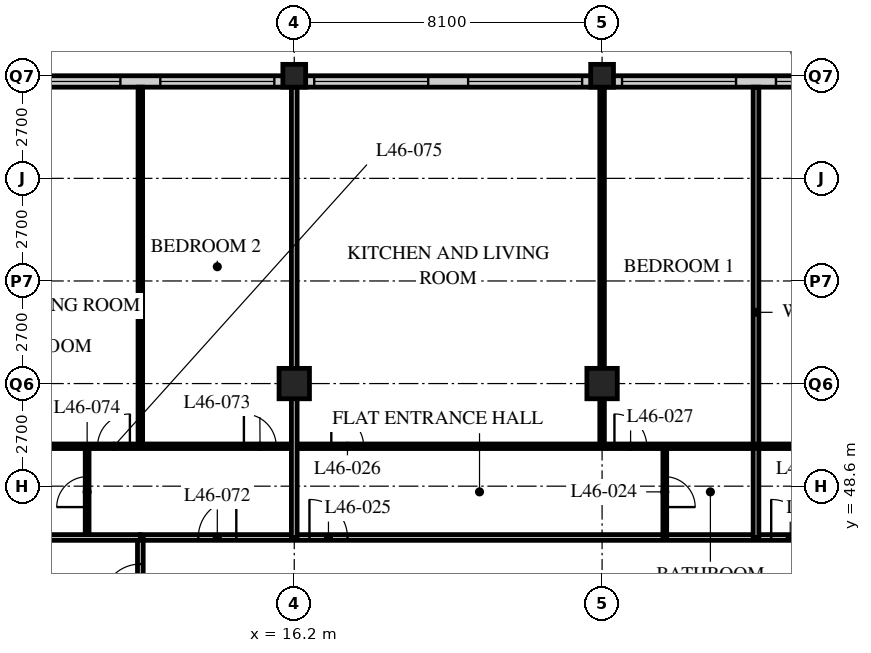
"""IFC4 building model, lengths in metres.
Left out: names, types, materials, properties, quantities, classifications, styles, units other than length and angle.
Written with IfcOpenShell. Run it as: python <this file> out.ifc"""

import sys

from ifc_helpers import new_model, si_unit, direction, frame, frame_2d, origin, origin_2d, place, context, subcontext, project, spatial, rectangle, hollow_rectangle, extrude, element, fill, save


model = new_model("IFC4")
c1 = context("Model", 3, precision=1e-05, world=origin(), true_north=direction((0.0, 1.0)))
c2 = subcontext(c1, "Body", "Model", "MODEL_VIEW")
j1 = project(units=[si_unit("LENGTHUNIT", "METRE"), si_unit("PLANEANGLEUNIT", "RADIAN")], contexts=[c1])
p1 = place(None, origin())
s1 = spatial("IfcSite", under=j1, at=p1, CompositionType="ELEMENT")
p2 = place(p1, origin())
s2 = spatial("IfcBuilding", under=s1, at=p2, CompositionType="ELEMENT")
p3 = place(p2, frame((0.0, 0.0, 181.2)))
s3 = spatial("IfcBuildingStorey", under=s2, at=p3, CompositionType="ELEMENT", Elevation=181.2)
p4 = place(p3, frame((16.2, 51.3, 0.0), z_axis=(0.0, 0.0, 1.0), x_axis=(1.0, 0.0, 0.0)))
e1 = element("IfcColumn", 1, at=p4, inside=s3, PredefinedType="COLUMN", context=c2, shape_type="SweptSolid", body=[
    extrude(hollow_rectangle(XDim=0.8, YDim=0.8, WallThickness=0.08, at=origin_2d()), origin(), (0.0, 0.0, 1.0), 3.6),
])
p5 = place(p3, frame((16.2, 59.4, 0.0), z_axis=(0.0, 0.0, 1.0), x_axis=(1.0, 0.0, 0.0)))
e2 = element("IfcColumn", 2, at=p5, inside=s3, PredefinedType="COLUMN", context=c2, shape_type="SweptSolid", body=[
    extrude(hollow_rectangle(XDim=0.6, YDim=0.6, WallThickness=0.05, at=origin_2d()), origin(), (0.0, 0.0, 1.0), 3.6),
])
p6 = place(p3, frame((24.3, 51.3, 0.0), z_axis=(0.0, 0.0, 1.0), x_axis=(1.0, 0.0, 0.0)))
e3 = element("IfcColumn", 3, at=p6, inside=s3, PredefinedType="COLUMN", context=c2, shape_type="SweptSolid", body=[
    extrude(hollow_rectangle(XDim=0.8, YDim=0.8, WallThickness=0.08, at=origin_2d()), origin(), (0.0, 0.0, 1.0), 3.6),
])
p7 = place(p3, frame((24.3, 59.4, 0.0), z_axis=(0.0, 0.0, 1.0), x_axis=(1.0, 0.0, 0.0)))
e4 = element("IfcColumn", 4, at=p7, inside=s3, PredefinedType="COLUMN", context=c2, shape_type="SweptSolid", body=[
    extrude(hollow_rectangle(XDim=0.6, YDim=0.6, WallThickness=0.05, at=origin_2d()), origin(), (0.0, 0.0, 1.0), 3.6),
])
p8 = place(p3, frame((48.3, 59.25, 0.0), z_axis=(0.0, 0.0, 1.0), x_axis=(-1.0, 0.0, 0.0)))
e5 = element("IfcWall", 5, at=p8, inside=s3, PredefinedType="SOLIDWALL", context=c2, shape_type="SweptSolid", body=[
    extrude(rectangle(XDim=40.2, YDim=0.3, at=frame_2d((20.1, 0.0))), origin(), (0.0, 0.0, 1.0), 3.39),
])
p9 = place(p8, frame((0.225, 0.0, 0.6)))
e6 = element("IfcOpeningElement", 6, at=p9, cuts=e5, PredefinedType="OPENING", context=c2, shape_type="SweptSolid", body=[
    extrude(rectangle(XDim=3.0, YDim=2.4, at=frame_2d((1.5, 1.2))), frame((0.0, 0.16, 0.0), z_axis=(0.0, -1.0, 0.0), x_axis=(1.0, 0.0, 0.0)), (0.0, 0.0, 1.0), 0.32),
])
p10 = place(p8, frame((4.275, 0.0, 0.6)))
e7 = element("IfcOpeningElement", 7, at=p10, cuts=e5, PredefinedType="OPENING", context=c2, shape_type="SweptSolid", body=[
    extrude(rectangle(XDim=3.0, YDim=2.4, at=frame_2d((1.5, 1.2))), frame((0.0, 0.16, 0.0), z_axis=(0.0, -1.0, 0.0), x_axis=(1.0, 0.0, 0.0)), (0.0, 0.0, 1.0), 0.32),
])
p11 = place(p8, frame((8.325, 0.0, 0.6)))
e8 = element("IfcOpeningElement", 8, at=p11, cuts=e5, PredefinedType="OPENING", context=c2, shape_type="SweptSolid", body=[
    extrude(rectangle(XDim=3.0, YDim=2.4, at=frame_2d((1.5, 1.2))), frame((0.0, 0.16, 0.0), z_axis=(0.0, -1.0, 0.0), x_axis=(1.0, 0.0, 0.0)), (0.0, 0.0, 1.0), 0.32),
])
p12 = place(p8, frame((12.375, 0.0, 0.6)))
e9 = element("IfcOpeningElement", 9, at=p12, cuts=e5, PredefinedType="OPENING", context=c2, shape_type="SweptSolid", body=[
    extrude(rectangle(XDim=3.0, YDim=2.4, at=frame_2d((1.5, 1.2))), frame((0.0, 0.16, 0.0), z_axis=(0.0, -1.0, 0.0), x_axis=(1.0, 0.0, 0.0)), (0.0, 0.0, 1.0), 0.32),
])
p13 = place(p8, frame((16.425, 0.0, 0.6)))
e10 = element("IfcOpeningElement", 10, at=p13, cuts=e5, PredefinedType="OPENING", context=c2, shape_type="SweptSolid", body=[
    extrude(rectangle(XDim=3.0, YDim=2.4, at=frame_2d((1.5, 1.2))), frame((0.0, 0.16, 0.0), z_axis=(0.0, -1.0, 0.0), x_axis=(1.0, 0.0, 0.0)), (0.0, 0.0, 1.0), 0.32),
])
p14 = place(p8, frame((20.475, 0.0, 0.6)))
e11 = element("IfcOpeningElement", 11, at=p14, cuts=e5, PredefinedType="OPENING", context=c2, shape_type="SweptSolid", body=[
    extrude(rectangle(XDim=3.0, YDim=2.4, at=frame_2d((1.5, 1.2))), frame((0.0, 0.16, 0.0), z_axis=(0.0, -1.0, 0.0), x_axis=(1.0, 0.0, 0.0)), (0.0, 0.0, 1.0), 0.32),
])
p15 = place(p8, frame((24.525, 0.0, 0.6)))
e12 = element("IfcOpeningElement", 12, at=p15, cuts=e5, PredefinedType="OPENING", context=c2, shape_type="SweptSolid", body=[
    extrude(rectangle(XDim=3.0, YDim=2.4, at=frame_2d((1.5, 1.2))), frame((0.0, 0.16, 0.0), z_axis=(0.0, -1.0, 0.0), x_axis=(1.0, 0.0, 0.0)), (0.0, 0.0, 1.0), 0.32),
])
p16 = place(p8, frame((28.575, 0.0, 0.6)))
e13 = element("IfcOpeningElement", 13, at=p16, cuts=e5, PredefinedType="OPENING", context=c2, shape_type="SweptSolid", body=[
    extrude(rectangle(XDim=3.0, YDim=2.4, at=frame_2d((1.5, 1.2))), frame((0.0, 0.16, 0.0), z_axis=(0.0, -1.0, 0.0), x_axis=(1.0, 0.0, 0.0)), (0.0, 0.0, 1.0), 0.32),
])
p17 = place(p8, frame((32.625, 0.0, 0.6)))
e14 = element("IfcOpeningElement", 14, at=p17, cuts=e5, PredefinedType="OPENING", context=c2, shape_type="SweptSolid", body=[
    extrude(rectangle(XDim=3.0, YDim=2.4, at=frame_2d((1.5, 1.2))), frame((0.0, 0.16, 0.0), z_axis=(0.0, -1.0, 0.0), x_axis=(1.0, 0.0, 0.0)), (0.0, 0.0, 1.0), 0.32),
])
p18 = place(p8, frame((36.675, 0.0, 0.6)))
e15 = element("IfcOpeningElement", 15, at=p18, cuts=e5, PredefinedType="OPENING", context=c2, shape_type="SweptSolid", body=[
    extrude(rectangle(XDim=3.0, YDim=2.4, at=frame_2d((1.5, 1.2))), frame((0.0, 0.16, 0.0), z_axis=(0.0, -1.0, 0.0), x_axis=(1.0, 0.0, 0.0)), (0.0, 0.0, 1.0), 0.32),
])
p19 = place(p3, frame((12.15, 47.25, 0.0), z_axis=(0.0, 0.0, 1.0), x_axis=(1.0, 0.0, 0.0)))
e16 = element("IfcWall", 16, at=p19, inside=s3, PredefinedType="PARTITIONING", context=c2, shape_type="SweptSolid", body=[
    extrude(rectangle(XDim=32.4, YDim=0.15, at=frame_2d((16.2, 0.0))), origin(), (0.0, 0.0, 1.0), 3.39),
])
p20 = place(p19, frame((4.45, 0.0, 0.0)))
e17 = element("IfcOpeningElement", 17, at=p20, cuts=e16, PredefinedType="OPENING", context=c2, shape_type="SweptSolid", body=[
    extrude(rectangle(XDim=1.0, YDim=2.1, at=frame_2d((0.5, 1.05))), frame((0.0, 0.085, 0.0), z_axis=(0.0, -1.0, 0.0), x_axis=(1.0, 0.0, 0.0)), (0.0, 0.0, 1.0), 0.17),
])
p21 = place(p19, frame((16.6, 0.0, 0.0)))
e18 = element("IfcOpeningElement", 18, at=p21, cuts=e16, PredefinedType="OPENING", context=c2, shape_type="SweptSolid", body=[
    extrude(rectangle(XDim=1.0, YDim=2.1, at=frame_2d((0.5, 1.05))), frame((0.0, 0.085, 0.0), z_axis=(0.0, -1.0, 0.0), x_axis=(1.0, 0.0, 0.0)), (0.0, 0.0, 1.0), 0.17),
])
p22 = place(p19, frame((29.875, 0.0, 0.0)))
e19 = element("IfcOpeningElement", 19, at=p22, cuts=e16, PredefinedType="OPENING", context=c2, shape_type="SweptSolid", body=[
    extrude(rectangle(XDim=1.0, YDim=2.1, at=frame_2d((0.5, 1.05))), frame((0.0, 0.085, 0.0), z_axis=(0.0, -1.0, 0.0), x_axis=(1.0, 0.0, 0.0)), (0.0, 0.0, 1.0), 0.17),
])
p23 = place(p19, frame((1.525, 0.0, 0.0)))
e20 = element("IfcOpeningElement", 20, at=p23, cuts=e16, PredefinedType="OPENING", context=c2, shape_type="SweptSolid", body=[
    extrude(rectangle(XDim=1.0, YDim=2.1, at=frame_2d((0.5, 1.05))), frame((0.0, 0.085, 0.0), z_axis=(0.0, -1.0, 0.0), x_axis=(1.0, 0.0, 0.0)), (0.0, 0.0, 1.0), 0.17),
])
p24 = place(p3, frame((12.15, 18.9, 0.0), z_axis=(0.0, 0.0, 1.0), x_axis=(0.0, 1.0, 0.0)))
e21 = element("IfcWall", 21, at=p24, inside=s3, PredefinedType="PARTITIONING", context=c2, shape_type="SweptSolid", body=[
    extrude(rectangle(XDim=28.35, YDim=0.15, at=frame_2d((14.175, 0.0))), origin(), (0.0, 0.0, 1.0), 3.39),
])
p25 = place(p24, frame((2.35, 0.0, 0.0)))
e22 = element("IfcOpeningElement", 22, at=p25, cuts=e21, PredefinedType="OPENING", context=c2, shape_type="SweptSolid", body=[
    extrude(rectangle(XDim=1.0, YDim=2.1, at=frame_2d((0.5, 1.05))), frame((0.0, 0.085, 0.0), z_axis=(0.0, -1.0, 0.0), x_axis=(1.0, 0.0, 0.0)), (0.0, 0.0, 1.0), 0.17),
])
p26 = place(p24, frame((6.4, 0.0, 0.0)))
e23 = element("IfcOpeningElement", 23, at=p26, cuts=e21, PredefinedType="OPENING", context=c2, shape_type="SweptSolid", body=[
    extrude(rectangle(XDim=1.0, YDim=2.1, at=frame_2d((0.5, 1.05))), frame((0.0, 0.085, 0.0), z_axis=(0.0, -1.0, 0.0), x_axis=(1.0, 0.0, 0.0)), (0.0, 0.0, 1.0), 0.17),
])
p27 = place(p24, frame((8.5, 0.0, 0.0)))
e24 = element("IfcOpeningElement", 24, at=p27, cuts=e21, PredefinedType="OPENING", context=c2, shape_type="SweptSolid", body=[
    extrude(rectangle(XDim=1.0, YDim=2.1, at=frame_2d((0.5, 1.05))), frame((0.0, 0.085, 0.0), z_axis=(0.0, -1.0, 0.0), x_axis=(1.0, 0.0, 0.0)), (0.0, 0.0, 1.0), 0.17),
])
p28 = place(p24, frame((16.6, 0.0, 0.0)))
e25 = element("IfcOpeningElement", 25, at=p28, cuts=e21, PredefinedType="OPENING", context=c2, shape_type="SweptSolid", body=[
    extrude(rectangle(XDim=1.0, YDim=2.1, at=frame_2d((0.5, 1.05))), frame((0.0, 0.085, 0.0), z_axis=(0.0, -1.0, 0.0), x_axis=(1.0, 0.0, 0.0)), (0.0, 0.0, 1.0), 0.17),
])
p29 = place(p24, frame((26.65, 0.0, 0.0)))
e26 = element("IfcOpeningElement", 26, at=p29, cuts=e21, PredefinedType="OPENING", context=c2, shape_type="SweptSolid", body=[
    extrude(rectangle(XDim=1.0, YDim=2.1, at=frame_2d((0.5, 1.05))), frame((0.0, 0.085, 0.0), z_axis=(0.0, -1.0, 0.0), x_axis=(1.0, 0.0, 0.0)), (0.0, 0.0, 1.0), 0.17),
])
p30 = place(p3, frame((25.95, 47.25, 0.0), z_axis=(0.0, 0.0, 1.0), x_axis=(0.0, 1.0, 0.0)))
e27 = element("IfcWall", 27, at=p30, inside=s3, PredefinedType="PARTITIONING", context=c2, shape_type="SweptSolid", body=[
    extrude(rectangle(XDim=2.4, YDim=0.1, at=frame_2d((1.2, 0.0))), origin(), (0.0, 0.0, 1.0), 3.39),
])
p31 = place(p30, frame((0.8, 0.0, 0.0)))
e28 = element("IfcOpeningElement", 28, at=p31, cuts=e27, PredefinedType="OPENING", context=c2, shape_type="SweptSolid", body=[
    extrude(rectangle(XDim=0.8, YDim=2.1, at=frame_2d((0.4, 1.05))), frame((0.0, 0.06, 0.0), z_axis=(0.0, -1.0, 0.0), x_axis=(1.0, 0.0, 0.0)), (0.0, 0.0, 1.0), 0.12),
])
p32 = place(p3, frame((24.3, 49.65, 0.0), z_axis=(0.0, 0.0, 1.0), x_axis=(0.0, 1.0, 0.0)))
e29 = element("IfcWall", 29, at=p32, inside=s3, PredefinedType="PARTITIONING", context=c2, shape_type="SweptSolid", body=[
    extrude(rectangle(XDim=9.45, YDim=0.12, at=frame_2d((4.725, 0.0))), origin(), (0.0, 0.0, 1.0), 2.778),
])
p33 = place(p3, frame((28.35, 47.25, 0.0), z_axis=(0.0, 0.0, 1.0), x_axis=(0.0, 1.0, 0.0)))
e30 = element("IfcWall", 30, at=p33, inside=s3, PredefinedType="PARTITIONING", context=c2, shape_type="SweptSolid", body=[
    extrude(rectangle(XDim=11.85, YDim=0.15, at=frame_2d((5.925, 0.0))), origin(), (0.0, 0.0, 1.0), 3.39),
])
p34 = place(p3, frame((10.75, 47.25, 0.0), z_axis=(0.0, 0.0, 1.0), x_axis=(0.0, 1.0, 0.0)))
e31 = element("IfcWall", 31, at=p34, inside=s3, PredefinedType="PARTITIONING", context=c2, shape_type="SweptSolid", body=[
    extrude(rectangle(XDim=2.4, YDim=0.1, at=frame_2d((1.2, 0.0))), origin(), (0.0, 0.0, 1.0), 3.39),
])
p35 = place(p34, frame((0.8, 0.0, 0.0)))
e32 = element("IfcOpeningElement", 32, at=p35, cuts=e31, PredefinedType="OPENING", context=c2, shape_type="SweptSolid", body=[
    extrude(rectangle(XDim=0.8, YDim=2.1, at=frame_2d((0.4, 1.05))), frame((0.0, 0.06, 0.0), z_axis=(0.0, -1.0, 0.0), x_axis=(1.0, 0.0, 0.0)), (0.0, 0.0, 1.0), 0.12),
])
p36 = place(p3, frame((8.15, 49.65, 0.0), z_axis=(0.0, 0.0, 1.0), x_axis=(1.0, 0.0, 0.0)))
e33 = element("IfcWall", 33, at=p36, inside=s3, PredefinedType="PARTITIONING", context=c2, shape_type="SweptSolid", body=[
    extrude(rectangle(XDim=40.4, YDim=0.12, at=frame_2d((20.2, 0.0))), origin(), (0.0, 0.0, 1.0), 3.39),
])
p37 = place(p36, frame((9.025, 0.0, 0.0)))
e34 = element("IfcOpeningElement", 34, at=p37, cuts=e33, PredefinedType="OPENING", context=c2, shape_type="SweptSolid", body=[
    extrude(rectangle(XDim=0.85, YDim=2.1, at=frame_2d((0.425, 1.05))), frame((0.0, 0.07, 0.0), z_axis=(0.0, -1.0, 0.0), x_axis=(1.0, 0.0, 0.0)), (0.0, 0.0, 1.0), 0.14),
])
p38 = place(p36, frame((16.475, 0.0, 0.0)))
e35 = element("IfcOpeningElement", 35, at=p38, cuts=e33, PredefinedType="OPENING", context=c2, shape_type="SweptSolid", body=[
    extrude(rectangle(XDim=0.85, YDim=2.1, at=frame_2d((0.425, 1.05))), frame((0.0, 0.07, 0.0), z_axis=(0.0, -1.0, 0.0), x_axis=(1.0, 0.0, 0.0)), (0.0, 0.0, 1.0), 0.14),
])
p39 = place(p36, frame((21.175, 0.0, 0.0)))
e36 = element("IfcOpeningElement", 36, at=p39, cuts=e33, PredefinedType="OPENING", context=c2, shape_type="SweptSolid", body=[
    extrude(rectangle(XDim=0.85, YDim=2.1, at=frame_2d((0.425, 1.05))), frame((0.0, 0.07, 0.0), z_axis=(0.0, -1.0, 0.0), x_axis=(1.0, 0.0, 0.0)), (0.0, 0.0, 1.0), 0.14),
])
p40 = place(p36, frame((28.625, 0.0, 0.0)))
e37 = element("IfcOpeningElement", 37, at=p40, cuts=e33, PredefinedType="OPENING", context=c2, shape_type="SweptSolid", body=[
    extrude(rectangle(XDim=0.85, YDim=2.1, at=frame_2d((0.425, 1.05))), frame((0.0, 0.07, 0.0), z_axis=(0.0, -1.0, 0.0), x_axis=(1.0, 0.0, 0.0)), (0.0, 0.0, 1.0), 0.14),
])
p41 = place(p36, frame((32.825, 0.0, 0.0)))
e38 = element("IfcOpeningElement", 38, at=p41, cuts=e33, PredefinedType="OPENING", context=c2, shape_type="SweptSolid", body=[
    extrude(rectangle(XDim=0.85, YDim=2.1, at=frame_2d((0.425, 1.05))), frame((0.0, 0.07, 0.0), z_axis=(0.0, -1.0, 0.0), x_axis=(1.0, 0.0, 0.0)), (0.0, 0.0, 1.0), 0.14),
])
p42 = place(p36, frame((36.675, 0.0, 0.0)))
e39 = element("IfcOpeningElement", 39, at=p42, cuts=e33, PredefinedType="OPENING", context=c2, shape_type="SweptSolid", body=[
    extrude(rectangle(XDim=0.85, YDim=2.1, at=frame_2d((0.425, 1.05))), frame((0.0, 0.07, 0.0), z_axis=(0.0, -1.0, 0.0), x_axis=(1.0, 0.0, 0.0)), (0.0, 0.0, 1.0), 0.14),
])
p43 = place(p36, frame((6.725, 0.0, 0.0)))
e40 = element("IfcOpeningElement", 40, at=p43, cuts=e33, PredefinedType="OPENING", context=c2, shape_type="SweptSolid", body=[
    extrude(rectangle(XDim=0.85, YDim=2.1, at=frame_2d((0.425, 1.05))), frame((0.0, 0.07, 0.0), z_axis=(0.0, -1.0, 0.0), x_axis=(1.0, 0.0, 0.0)), (0.0, 0.0, 1.0), 0.14),
])
p44 = place(p36, frame((2.875, 0.0, 0.0)))
e41 = element("IfcOpeningElement", 41, at=p44, cuts=e33, PredefinedType="OPENING", context=c2, shape_type="SweptSolid", body=[
    extrude(rectangle(XDim=0.85, YDim=2.1, at=frame_2d((0.425, 1.05))), frame((0.0, 0.07, 0.0), z_axis=(0.0, -1.0, 0.0), x_axis=(1.0, 0.0, 0.0)), (0.0, 0.0, 1.0), 0.14),
])
p45 = place(p3, frame((12.15, 49.65, 0.0), z_axis=(0.0, 0.0, 1.0), x_axis=(0.0, 1.0, 0.0)))
e42 = element("IfcWall", 42, at=p45, inside=s3, PredefinedType="PARTITIONING", context=c2, shape_type="SweptSolid", body=[
    extrude(rectangle(XDim=9.45, YDim=0.12, at=frame_2d((4.725, 0.0))), origin(), (0.0, 0.0, 1.0), 3.39),
])
p46 = place(p3, frame((0.3, 47.25, 0.0), z_axis=(0.0, 0.0, 1.0), x_axis=(1.0, 0.0, 0.0)))
e43 = element("IfcWall", 43, at=p46, inside=s3, PredefinedType="PARTITIONING", context=c2, shape_type="SweptSolid", body=[
    extrude(rectangle(XDim=11.85, YDim=0.15, at=frame_2d((5.925, 0.0))), origin(), (0.0, 0.0, 1.0), 3.39),
])
p47 = place(p3, frame((16.2, 47.25, 0.0), z_axis=(0.0, 0.0, 1.0), x_axis=(0.0, 1.0, 0.0)))
e44 = element("IfcWall", 44, at=p47, inside=s3, PredefinedType="PARTITIONING", context=c2, shape_type="SweptSolid", body=[
    extrude(rectangle(XDim=11.85, YDim=0.15, at=frame_2d((5.925, 0.0))), origin(), (0.0, 0.0, 1.0), 2.778),
])
p48 = place(p13, origin())
e45 = element("IfcWindow", 45, at=p48, inside=s3, PartitioningType="SINGLE_PANEL", PredefinedType="WINDOW", context=c2, shape_type="SweptSolid", body=[
    extrude(rectangle(XDim=3.0, YDim=2.4, at=frame_2d((1.5, 1.2))), frame((0.0, 0.03, 0.0), z_axis=(0.0, -1.0, 0.0), x_axis=(1.0, 0.0, 0.0)), (0.0, 0.0, 1.0), 0.06),
])
fill(e10, e45)
p49 = place(p14, origin())
e46 = element("IfcWindow", 46, at=p49, inside=s3, PartitioningType="SINGLE_PANEL", PredefinedType="WINDOW", context=c2, shape_type="SweptSolid", body=[
    extrude(rectangle(XDim=3.0, YDim=2.4, at=frame_2d((1.5, 1.2))), frame((0.0, 0.03, 0.0), z_axis=(0.0, -1.0, 0.0), x_axis=(1.0, 0.0, 0.0)), (0.0, 0.0, 1.0), 0.06),
])
fill(e11, e46)
p50 = place(p15, origin())
e47 = element("IfcWindow", 47, at=p50, inside=s3, PartitioningType="SINGLE_PANEL", PredefinedType="WINDOW", context=c2, shape_type="SweptSolid", body=[
    extrude(rectangle(XDim=3.0, YDim=2.4, at=frame_2d((1.5, 1.2))), frame((0.0, 0.03, 0.0), z_axis=(0.0, -1.0, 0.0), x_axis=(1.0, 0.0, 0.0)), (0.0, 0.0, 1.0), 0.06),
])
fill(e12, e47)
p51 = place(p16, origin())
e48 = element("IfcWindow", 48, at=p51, inside=s3, PartitioningType="SINGLE_PANEL", PredefinedType="WINDOW", context=c2, shape_type="SweptSolid", body=[
    extrude(rectangle(XDim=3.0, YDim=2.4, at=frame_2d((1.5, 1.2))), frame((0.0, 0.03, 0.0), z_axis=(0.0, -1.0, 0.0), x_axis=(1.0, 0.0, 0.0)), (0.0, 0.0, 1.0), 0.06),
])
fill(e13, e48)
p52 = place(p17, origin())
e49 = element("IfcWindow", 49, at=p52, inside=s3, PartitioningType="SINGLE_PANEL", PredefinedType="WINDOW", context=c2, shape_type="SweptSolid", body=[
    extrude(rectangle(XDim=3.0, YDim=2.4, at=frame_2d((1.5, 1.2))), frame((0.0, 0.03, 0.0), z_axis=(0.0, -1.0, 0.0), x_axis=(1.0, 0.0, 0.0)), (0.0, 0.0, 1.0), 0.06),
])
fill(e14, e49)
p53 = place(p18, origin())
e50 = element("IfcWindow", 50, at=p53, inside=s3, PartitioningType="SINGLE_PANEL", PredefinedType="WINDOW", context=c2, shape_type="SweptSolid", body=[
    extrude(rectangle(XDim=3.0, YDim=2.4, at=frame_2d((1.5, 1.2))), frame((0.0, 0.03, 0.0), z_axis=(0.0, -1.0, 0.0), x_axis=(1.0, 0.0, 0.0)), (0.0, 0.0, 1.0), 0.06),
])
fill(e15, e50)
p54 = place(p31, origin())
e51 = element("IfcDoor", 51, at=p54, inside=s3, OperationType="SINGLE_SWING_RIGHT", PredefinedType="DOOR", context=c2, shape_type="SweptSolid", body=[
    extrude(rectangle(XDim=0.8, YDim=2.1, at=frame_2d((0.4, 1.05))), frame((0.0, 0.025, 0.0), z_axis=(0.0, -1.0, 0.0), x_axis=(1.0, 0.0, 0.0)), (0.0, 0.0, 1.0), 0.05),
])
fill(e28, e51)
p55 = place(p20, origin())
e52 = element("IfcDoor", 52, at=p55, inside=s3, OperationType="SINGLE_SWING_LEFT", PredefinedType="DOOR", context=c2, shape_type="SweptSolid", body=[
    extrude(rectangle(XDim=1.0, YDim=2.1, at=frame_2d((0.5, 1.05))), frame((0.0, 0.025, 0.0), z_axis=(0.0, -1.0, 0.0), x_axis=(1.0, 0.0, 0.0)), (0.0, 0.0, 1.0), 0.05),
])
fill(e17, e52)
p56 = place(p37, origin())
e53 = element("IfcDoor", 53, at=p56, inside=s3, OperationType="SINGLE_SWING_LEFT", PredefinedType="DOOR", context=c2, shape_type="SweptSolid", body=[
    extrude(rectangle(XDim=0.85, YDim=2.1, at=frame_2d((0.425, 1.05))), frame((0.0, 0.025, 0.0), z_axis=(0.0, -1.0, 0.0), x_axis=(1.0, 0.0, 0.0)), (0.0, 0.0, 1.0), 0.05),
])
fill(e34, e53)
p57 = place(p38, origin())
e54 = element("IfcDoor", 54, at=p57, inside=s3, OperationType="SINGLE_SWING_LEFT", PredefinedType="DOOR", context=c2, shape_type="SweptSolid", body=[
    extrude(rectangle(XDim=0.85, YDim=2.1, at=frame_2d((0.425, 1.05))), frame((0.0, 0.025, 0.0), z_axis=(0.0, -1.0, 0.0), x_axis=(1.0, 0.0, 0.0)), (0.0, 0.0, 1.0), 0.05),
])
fill(e35, e54)
p58 = place(p21, origin())
e55 = element("IfcDoor", 55, at=p58, inside=s3, OperationType="SINGLE_SWING_LEFT", PredefinedType="DOOR", context=c2, shape_type="SweptSolid", body=[
    extrude(rectangle(XDim=1.0, YDim=2.1, at=frame_2d((0.5, 1.05))), frame((0.0, 0.025, 0.0), z_axis=(0.0, -1.0, 0.0), x_axis=(1.0, 0.0, 0.0)), (0.0, 0.0, 1.0), 0.05),
])
fill(e18, e55)
p59 = place(p29, origin())
e56 = element("IfcDoor", 56, at=p59, inside=s3, OperationType="SINGLE_SWING_LEFT", PredefinedType="DOOR", context=c2, shape_type="SweptSolid", body=[
    extrude(rectangle(XDim=1.0, YDim=2.1, at=frame_2d((0.5, 1.05))), frame((0.0, 0.025, 0.0), z_axis=(0.0, -1.0, 0.0), x_axis=(1.0, 0.0, 0.0)), (0.0, 0.0, 1.0), 0.05),
])
fill(e26, e56)
p60 = place(p23, origin())
e57 = element("IfcDoor", 57, at=p60, inside=s3, OperationType="SINGLE_SWING_RIGHT", PredefinedType="DOOR", context=c2, shape_type="SweptSolid", body=[
    extrude(rectangle(XDim=1.0, YDim=2.1, at=frame_2d((0.5, 1.05))), frame((0.0, 0.025, 0.0), z_axis=(0.0, -1.0, 0.0), x_axis=(1.0, 0.0, 0.0)), (0.0, 0.0, 1.0), 0.05),
])
fill(e20, e57)
p61 = place(p43, origin())
e58 = element("IfcDoor", 58, at=p61, inside=s3, OperationType="SINGLE_SWING_LEFT", PredefinedType="DOOR", context=c2, shape_type="SweptSolid", body=[
    extrude(rectangle(XDim=0.85, YDim=2.1, at=frame_2d((0.425, 1.05))), frame((0.0, 0.025, 0.0), z_axis=(0.0, -1.0, 0.0), x_axis=(1.0, 0.0, 0.0)), (0.0, 0.0, 1.0), 0.05),
])
fill(e40, e58)
p62 = place(p35, origin())
e59 = element("IfcDoor", 59, at=p62, inside=s3, OperationType="SINGLE_SWING_LEFT", PredefinedType="DOOR", context=c2, shape_type="SweptSolid", body=[
    extrude(rectangle(XDim=0.8, YDim=2.1, at=frame_2d((0.4, 1.05))), frame((0.0, 0.025, 0.0), z_axis=(0.0, -1.0, 0.0), x_axis=(1.0, 0.0, 0.0)), (0.0, 0.0, 1.0), 0.05),
])
fill(e32, e59)
p63 = place(p44, origin())
e60 = element("IfcDoor", 60, at=p63, inside=s3, OperationType="SINGLE_SWING_RIGHT", PredefinedType="DOOR", context=c2, shape_type="SweptSolid", body=[
    extrude(rectangle(XDim=0.85, YDim=2.1, at=frame_2d((0.425, 1.05))), frame((0.0, 0.025, 0.0), z_axis=(0.0, -1.0, 0.0), x_axis=(1.0, 0.0, 0.0)), (0.0, 0.0, 1.0), 0.05),
])
fill(e41, e60)
save(model, sys.argv[1])
